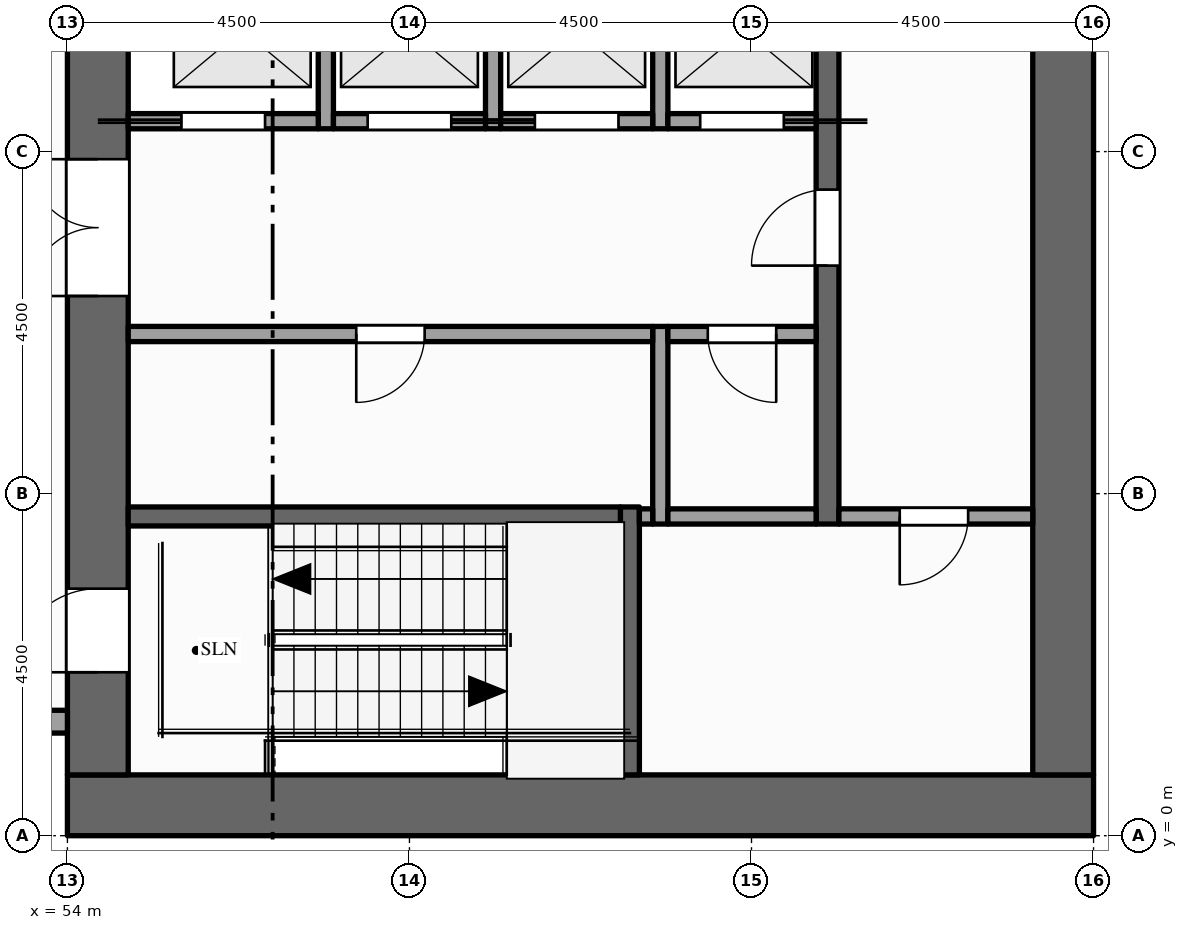
"""IFC4 building model, lengths in metres.
Left out: names, types, materials, properties, quantities, classifications, styles, units other than length and angle.
Written with IfcOpenShell. Run it as: python <this file> out.ifc"""

import sys

from ifc_helpers import new_model, si_unit, direction, frame, frame_2d, origin, place, context, subcontext, project, spatial, rectangle, extrude, element, fill, save


model = new_model("IFC4")
c1 = context("Model", 3, precision=1e-05, world=origin(), true_north=direction((0.0, 1.0)))
c2 = subcontext(c1, "Body", "Model", "MODEL_VIEW")
j1 = project(units=[si_unit("LENGTHUNIT", "METRE"), si_unit("PLANEANGLEUNIT", "RADIAN")], contexts=[c1])
p1 = place(None, origin())
s1 = spatial("IfcSite", under=j1, at=p1, CompositionType="ELEMENT")
p2 = place(p1, origin())
s2 = spatial("IfcBuilding", under=s1, at=p2, CompositionType="ELEMENT")
p3 = place(p2, frame((0.0, 0.0, 289.0)))
s3 = spatial("IfcBuildingStorey", under=s2, at=p3, CompositionType="ELEMENT", Elevation=289.0)
p4 = place(p3, frame((67.5, 0.4, -0.15), z_axis=(0.0, 0.0, 1.0), x_axis=(-1.0, 0.0, 0.0)))
e1 = element("IfcWall", 1, at=p4, inside=s3, PredefinedType="SHEAR", context=c2, shape_type="SweptSolid", body=[
    extrude(rectangle(XDim=13.5, YDim=0.8, at=frame_2d((6.75, 0.0))), origin(), (0.0, 0.0, 1.0), 4.0),
])
p5 = place(p3, frame((54.4, 0.8, -0.15), z_axis=(0.0, 0.0, 1.0), x_axis=(0.0, 1.0, 0.0)))
e2 = element("IfcWall", 2, at=p5, inside=s3, PredefinedType="SHEAR", context=c2, shape_type="SweptSolid", body=[
    extrude(rectangle(XDim=20.9, YDim=0.8, at=frame_2d((10.45, 0.0))), origin(), (0.0, 0.0, 1.0), 4.0),
])
p6 = place(p5, frame((6.3, 0.0, 0.15)))
e3 = element("IfcOpeningElement", 3, at=p6, cuts=e2, PredefinedType="OPENING", context=c2, shape_type="SweptSolid", body=[
    extrude(rectangle(XDim=1.8, YDim=2.1, at=frame_2d((0.9, 1.05))), frame((0.0, 0.41, 0.0), z_axis=(0.0, -1.0, 0.0), x_axis=(1.0, 0.0, 0.0)), (0.0, 0.0, 1.0), 0.82),
])
p7 = place(p5, frame((12.35, 0.0, 0.15)))
e4 = element("IfcOpeningElement", 4, at=p7, cuts=e2, PredefinedType="OPENING", context=c2, shape_type="SweptSolid", body=[
    extrude(rectangle(XDim=1.1, YDim=2.1, at=frame_2d((0.55, 1.05))), frame((0.0, 0.41, 0.0), z_axis=(0.0, -1.0, 0.0), x_axis=(1.0, 0.0, 0.0)), (0.0, 0.0, 1.0), 0.82),
])
p8 = place(p5, frame((1.35, 0.0, 0.15)))
e5 = element("IfcOpeningElement", 5, at=p8, cuts=e2, PredefinedType="OPENING", context=c2, shape_type="SweptSolid", body=[
    extrude(rectangle(XDim=1.1, YDim=2.1, at=frame_2d((0.55, 1.05))), frame((0.0, 0.41, 0.0), z_axis=(0.0, -1.0, 0.0), x_axis=(1.0, 0.0, 0.0)), (0.0, 0.0, 1.0), 0.82),
])
p9 = place(p5, frame((18.55, 0.0, 0.15)))
e6 = element("IfcOpeningElement", 6, at=p9, cuts=e2, PredefinedType="OPENING", context=c2, shape_type="SweptSolid", body=[
    extrude(rectangle(XDim=1.1, YDim=2.1, at=frame_2d((0.55, 1.05))), frame((0.0, 0.41, 0.0), z_axis=(0.0, -1.0, 0.0), x_axis=(1.0, 0.0, 0.0)), (0.0, 0.0, 1.0), 0.82),
])
p10 = place(p3, frame((67.1, 0.8, -0.15), z_axis=(0.0, 0.0, 1.0), x_axis=(0.0, 1.0, 0.0)))
e7 = element("IfcWall", 7, at=p10, inside=s3, PredefinedType="SHEAR", context=c2, shape_type="SweptSolid", body=[
    extrude(rectangle(XDim=20.9, YDim=0.8, at=frame_2d((10.45, 0.0))), origin(), (0.0, 0.0, 1.0), 4.0),
])
p11 = place(p3, frame((49.825, 1.5, 0.0), z_axis=(0.0, 0.0, 1.0), x_axis=(1.0, 0.0, 0.0)))
e8 = element("IfcWall", 8, at=p11, inside=s3, PredefinedType="STANDARD", context=c2, shape_type="SweptSolid", body=[
    extrude(rectangle(XDim=4.175, YDim=0.3, at=frame_2d((2.087, 0.0))), origin(), (0.0, 0.0, 1.0), 2.87),
])
p12 = place(p11, frame((0.413, 0.0, 0.9)))
e9 = element("IfcOpeningElement", 9, at=p12, cuts=e8, PredefinedType="OPENING", context=c2, shape_type="SweptSolid", body=[
    extrude(rectangle(XDim=1.2, YDim=1.75, at=frame_2d((0.6, 0.875))), frame((0.0, 0.16, 0.0), z_axis=(0.0, -1.0, 0.0), x_axis=(1.0, 0.0, 0.0)), (0.0, 0.0, 1.0), 0.32),
])
p13 = place(p11, frame((2.225, 0.0, 0.9)))
e10 = element("IfcOpeningElement", 10, at=p13, cuts=e8, PredefinedType="OPENING", context=c2, shape_type="SweptSolid", body=[
    extrude(rectangle(XDim=1.55, YDim=1.75, at=frame_2d((0.775, 0.875))), frame((0.0, 0.16, 0.0), z_axis=(0.0, -1.0, 0.0), x_axis=(1.0, 0.0, 0.0)), (0.0, 0.0, 1.0), 0.32),
])
for number, where, z_axis, x_axis in (
    (11, (57.4, 9.3, 0.0), (0.0, 0.0, 1.0), (0.0, 1.0, 0.0)),
    (12, (59.6, 9.3, 0.0), (0.0, 0.0, 1.0), (0.0, 1.0, 0.0)),
):
    element("IfcWall", number, at=place(p3, frame(where, z_axis=z_axis, x_axis=x_axis)), inside=s3, PredefinedType="SOLIDWALL", context=c2, shape_type="SweptSolid", body=[
        extrude(rectangle(XDim=2.6, YDim=0.2, at=frame_2d((1.3, 0.0))), origin(), (0.0, 0.0, 1.0), 3.85),
    ])
p14 = place(p3, frame((61.4, 0.8, 0.0), z_axis=(0.0, 0.0, 1.0), x_axis=(0.0, 1.0, 0.0)))
e13 = element("IfcWall", 13, at=p14, inside=s3, PredefinedType="SHEAR", context=c2, shape_type="SweptSolid", body=[
    extrude(rectangle(XDim=3.525, YDim=0.25, at=frame_2d((1.762, 0.0))), origin(), (0.0, 0.0, 1.0), 3.85),
])
p15 = place(p3, frame((61.8, 4.1, 0.0), z_axis=(0.0, 0.0, 1.0), x_axis=(0.0, 1.0, 0.0)))
e14 = element("IfcWall", 14, at=p15, inside=s3, PredefinedType="PARTITIONING", context=c2, shape_type="SweptSolid", body=[
    extrude(rectangle(XDim=2.6, YDim=0.2, at=frame_2d((1.3, 0.0))), origin(), (0.0, 0.0, 1.0), 3.85),
])
p16 = place(p3, frame((61.8, 9.3, 0.0), z_axis=(0.0, 0.0, 1.0), x_axis=(0.0, 1.0, 0.0)))
e15 = element("IfcWall", 15, at=p16, inside=s3, PredefinedType="SOLIDWALL", context=c2, shape_type="SweptSolid", body=[
    extrude(rectangle(XDim=2.6, YDim=0.2, at=frame_2d((1.3, 0.0))), origin(), (0.0, 0.0, 1.0), 3.85),
])
p17 = place(p3, frame((64.0, 4.1, 0.0), z_axis=(0.0, 0.0, 1.0), x_axis=(0.0, 1.0, 0.0)))
e16 = element("IfcWall", 16, at=p17, inside=s3, PredefinedType="SHEAR", context=c2, shape_type="SweptSolid", body=[
    extrude(rectangle(XDim=14.5, YDim=0.3, at=frame_2d((7.25, 0.0))), origin(), (0.0, 0.0, 1.0), 3.85),
])
p18 = place(p17, frame((3.4, 0.0, 0.0)))
e17 = element("IfcOpeningElement", 17, at=p18, cuts=e16, PredefinedType="OPENING", context=c2, shape_type="SweptSolid", body=[
    extrude(rectangle(XDim=1.0, YDim=2.1, at=frame_2d((0.5, 1.05))), frame((0.0, 0.16, 0.0), z_axis=(0.0, -1.0, 0.0), x_axis=(1.0, 0.0, 0.0)), (0.0, 0.0, 1.0), 0.32),
])
p19 = place(p17, frame((9.1, 0.0, 0.0)))
e18 = element("IfcOpeningElement", 18, at=p19, cuts=e16, PredefinedType="OPENING", context=c2, shape_type="SweptSolid", body=[
    extrude(rectangle(XDim=1.0, YDim=2.1, at=frame_2d((0.5, 1.05))), frame((0.0, 0.16, 0.0), z_axis=(0.0, -1.0, 0.0), x_axis=(1.0, 0.0, 0.0)), (0.0, 0.0, 1.0), 0.32),
])
p20 = place(p3, frame((54.8, 4.2, 0.0), z_axis=(0.0, 0.0, 1.0), x_axis=(1.0, 0.0, 0.0)))
e19 = element("IfcWall", 19, at=p20, inside=s3, PredefinedType="SHEAR", context=c2, shape_type="SweptSolid", body=[
    extrude(rectangle(XDim=6.475, YDim=0.25, at=frame_2d((3.237, 0.0))), origin(), (0.0, 0.0, 1.0), 3.85),
])
p21 = place(p3, frame((61.525, 4.2, 0.0), z_axis=(0.0, 0.0, 1.0), x_axis=(1.0, 0.0, 0.0)))
e20 = element("IfcWall", 20, at=p21, inside=s3, PredefinedType="PARTITIONING", context=c2, shape_type="SweptSolid", body=[
    extrude(rectangle(XDim=0.175, YDim=0.2, at=frame_2d((0.087, 0.0))), origin(), (0.0, 0.0, 1.0), 3.85),
])
p22 = place(p3, frame((61.9, 4.2, 0.0), z_axis=(0.0, 0.0, 1.0), x_axis=(1.0, 0.0, 0.0)))
e21 = element("IfcWall", 21, at=p22, inside=s3, PredefinedType="PARTITIONING", context=c2, shape_type="SweptSolid", body=[
    extrude(rectangle(XDim=1.95, YDim=0.2, at=frame_2d((0.975, 0.0))), origin(), (0.0, 0.0, 1.0), 3.85),
])
p23 = place(p3, frame((64.15, 4.2, 0.0), z_axis=(0.0, 0.0, 1.0), x_axis=(1.0, 0.0, 0.0)))
e22 = element("IfcWall", 22, at=p23, inside=s3, PredefinedType="PARTITIONING", context=c2, shape_type="SweptSolid", body=[
    extrude(rectangle(XDim=2.55, YDim=0.2, at=frame_2d((1.275, 0.0))), origin(), (0.0, 0.0, 1.0), 3.85),
])
p24 = place(p23, frame((0.8, 0.0, 0.0)))
e23 = element("IfcOpeningElement", 23, at=p24, cuts=e22, PredefinedType="OPENING", context=c2, shape_type="SweptSolid", body=[
    extrude(rectangle(XDim=0.9, YDim=2.1, at=frame_2d((0.45, 1.05))), frame((0.0, 0.11, 0.0), z_axis=(0.0, -1.0, 0.0), x_axis=(1.0, 0.0, 0.0)), (0.0, 0.0, 1.0), 0.22),
])
p25 = place(p3, frame((54.8, 6.6, 0.0), z_axis=(0.0, 0.0, 1.0), x_axis=(1.0, 0.0, 0.0)))
e24 = element("IfcWall", 24, at=p25, inside=s3, PredefinedType="PARTITIONING", context=c2, shape_type="SweptSolid", body=[
    extrude(rectangle(XDim=6.9, YDim=0.2, at=frame_2d((3.45, 0.0))), origin(), (0.0, 0.0, 1.0), 3.85),
])
p26 = place(p25, frame((3.0, 0.0, 0.0)))
e25 = element("IfcOpeningElement", 25, at=p26, cuts=e24, PredefinedType="OPENING", context=c2, shape_type="SweptSolid", body=[
    extrude(rectangle(XDim=0.9, YDim=2.1, at=frame_2d((0.45, 1.05))), frame((0.0, 0.11, 0.0), z_axis=(0.0, -1.0, 0.0), x_axis=(1.0, 0.0, 0.0)), (0.0, 0.0, 1.0), 0.22),
])
p27 = place(p3, frame((61.9, 6.6, 0.0), z_axis=(0.0, 0.0, 1.0), x_axis=(1.0, 0.0, 0.0)))
e26 = element("IfcWall", 26, at=p27, inside=s3, PredefinedType="PARTITIONING", context=c2, shape_type="SweptSolid", body=[
    extrude(rectangle(XDim=1.95, YDim=0.2, at=frame_2d((0.975, 0.0))), origin(), (0.0, 0.0, 1.0), 3.85),
])
p28 = place(p27, frame((0.525, 0.0, 0.0)))
e27 = element("IfcOpeningElement", 27, at=p28, cuts=e26, PredefinedType="OPENING", context=c2, shape_type="SweptSolid", body=[
    extrude(rectangle(XDim=0.9, YDim=2.1, at=frame_2d((0.45, 1.05))), frame((0.0, 0.11, 0.0), z_axis=(0.0, -1.0, 0.0), x_axis=(1.0, 0.0, 0.0)), (0.0, 0.0, 1.0), 0.22),
])
p29 = place(p3, frame((54.8, 9.4, 0.0), z_axis=(0.0, 0.0, 1.0), x_axis=(1.0, 0.0, 0.0)))
e28 = element("IfcWall", 28, at=p29, inside=s3, PredefinedType="SOLIDWALL", context=c2, shape_type="SweptSolid", body=[
    extrude(rectangle(XDim=2.5, YDim=0.2, at=frame_2d((1.25, 0.0))), origin(), (0.0, 0.0, 1.0), 3.85),
])
p30 = place(p29, frame((0.7, 0.0, 0.012)))
e29 = element("IfcOpeningElement", 29, at=p30, cuts=e28, PredefinedType="OPENING", context=c2, shape_type="SweptSolid", body=[
    extrude(rectangle(XDim=1.1, YDim=2.1, at=frame_2d((0.55, 1.05))), frame((0.0, 0.11, 0.0), z_axis=(0.0, -1.0, 0.0), x_axis=(1.0, 0.0, 0.0)), (0.0, 0.0, 1.0), 0.22),
])
p31 = place(p3, frame((57.5, 9.4, 0.0), z_axis=(0.0, 0.0, 1.0), x_axis=(1.0, 0.0, 0.0)))
e30 = element("IfcWall", 30, at=p31, inside=s3, PredefinedType="SOLIDWALL", context=c2, shape_type="SweptSolid", body=[
    extrude(rectangle(XDim=2.0, YDim=0.2, at=frame_2d((1.0, 0.0))), origin(), (0.0, 0.0, 1.0), 3.85),
])
p32 = place(p31, frame((0.45, 0.0, 0.012)))
e31 = element("IfcOpeningElement", 31, at=p32, cuts=e30, PredefinedType="OPENING", context=c2, shape_type="SweptSolid", body=[
    extrude(rectangle(XDim=1.1, YDim=2.1, at=frame_2d((0.55, 1.05))), frame((0.0, 0.11, 0.0), z_axis=(0.0, -1.0, 0.0), x_axis=(1.0, 0.0, 0.0)), (0.0, 0.0, 1.0), 0.22),
])
p33 = place(p3, frame((59.7, 9.4, 0.0), z_axis=(0.0, 0.0, 1.0), x_axis=(1.0, 0.0, 0.0)))
e32 = element("IfcWall", 32, at=p33, inside=s3, PredefinedType="SOLIDWALL", context=c2, shape_type="SweptSolid", body=[
    extrude(rectangle(XDim=2.0, YDim=0.2, at=frame_2d((1.0, 0.0))), origin(), (0.0, 0.0, 1.0), 3.85),
])
p34 = place(p33, frame((0.45, 0.0, 0.012)))
e33 = element("IfcOpeningElement", 33, at=p34, cuts=e32, PredefinedType="OPENING", context=c2, shape_type="SweptSolid", body=[
    extrude(rectangle(XDim=1.1, YDim=2.1, at=frame_2d((0.55, 1.05))), frame((0.0, 0.11, 0.0), z_axis=(0.0, -1.0, 0.0), x_axis=(1.0, 0.0, 0.0)), (0.0, 0.0, 1.0), 0.22),
])
p35 = place(p3, frame((61.9, 9.4, 0.0), z_axis=(0.0, 0.0, 1.0), x_axis=(1.0, 0.0, 0.0)))
e34 = element("IfcWall", 34, at=p35, inside=s3, PredefinedType="SOLIDWALL", context=c2, shape_type="SweptSolid", body=[
    extrude(rectangle(XDim=1.95, YDim=0.2, at=frame_2d((0.975, 0.0))), origin(), (0.0, 0.0, 1.0), 3.85),
])
p36 = place(p35, frame((0.425, 0.0, 0.012)))
e35 = element("IfcOpeningElement", 35, at=p36, cuts=e34, PredefinedType="OPENING", context=c2, shape_type="SweptSolid", body=[
    extrude(rectangle(XDim=1.1, YDim=2.1, at=frame_2d((0.55, 1.05))), frame((0.0, 0.11, 0.0), z_axis=(0.0, -1.0, 0.0), x_axis=(1.0, 0.0, 0.0)), (0.0, 0.0, 1.0), 0.22),
])
p37 = place(p30, origin())
e36 = element("IfcDoor", 36, at=p37, inside=s3, OperationType="SLIDING_TO_LEFT", PredefinedType="DOOR", context=c2, shape_type="SweptSolid", body=[
    extrude(rectangle(XDim=1.1, YDim=2.1, at=frame_2d((0.55, 1.05))), frame((0.0, 0.025, 0.0), z_axis=(0.0, -1.0, 0.0), x_axis=(1.0, 0.0, 0.0)), (0.0, 0.0, 1.0), 0.05),
])
fill(e29, e36)
p38 = place(p32, origin())
e37 = element("IfcDoor", 37, at=p38, inside=s3, OperationType="SLIDING_TO_RIGHT", PredefinedType="DOOR", context=c2, shape_type="SweptSolid", body=[
    extrude(rectangle(XDim=1.1, YDim=2.1, at=frame_2d((0.55, 1.05))), frame((0.0, 0.025, 0.0), z_axis=(0.0, -1.0, 0.0), x_axis=(1.0, 0.0, 0.0)), (0.0, 0.0, 1.0), 0.05),
])
fill(e31, e37)
p39 = place(p34, origin())
e38 = element("IfcDoor", 38, at=p39, inside=s3, OperationType="SLIDING_TO_LEFT", PredefinedType="DOOR", context=c2, shape_type="SweptSolid", body=[
    extrude(rectangle(XDim=1.1, YDim=2.1, at=frame_2d((0.55, 1.05))), frame((0.0, 0.025, 0.0), z_axis=(0.0, -1.0, 0.0), x_axis=(1.0, 0.0, 0.0)), (0.0, 0.0, 1.0), 0.05),
])
fill(e33, e38)
p40 = place(p36, origin())
e39 = element("IfcDoor", 39, at=p40, inside=s3, OperationType="SLIDING_TO_RIGHT", PredefinedType="DOOR", context=c2, shape_type="SweptSolid", body=[
    extrude(rectangle(XDim=1.1, YDim=2.1, at=frame_2d((0.55, 1.05))), frame((0.0, 0.025, 0.0), z_axis=(0.0, -1.0, 0.0), x_axis=(1.0, 0.0, 0.0)), (0.0, 0.0, 1.0), 0.05),
])
fill(e35, e39)
p41 = place(p6, origin())
e40 = element("IfcDoor", 40, at=p41, inside=s3, OperationType="DOUBLE_DOOR_SINGLE_SWING", PredefinedType="DOOR", context=c2, shape_type="SweptSolid", body=[
    extrude(rectangle(XDim=1.8, YDim=2.1, at=frame_2d((0.9, 1.05))), frame((0.0, 0.025, 0.0), z_axis=(0.0, -1.0, 0.0), x_axis=(1.0, 0.0, 0.0)), (0.0, 0.0, 1.0), 0.05),
])
fill(e3, e40)
p42 = place(p18, origin())
e41 = element("IfcDoor", 41, at=p42, inside=s3, OperationType="SINGLE_SWING_LEFT", PredefinedType="DOOR", context=c2, shape_type="SweptSolid", body=[
    extrude(rectangle(XDim=1.0, YDim=2.1, at=frame_2d((0.5, 1.05))), frame((0.0, 0.025, 0.0), z_axis=(0.0, -1.0, 0.0), x_axis=(1.0, 0.0, 0.0)), (0.0, 0.0, 1.0), 0.05),
])
fill(e17, e41)
p43 = place(p8, origin())
e42 = element("IfcDoor", 42, at=p43, inside=s3, OperationType="SINGLE_SWING_LEFT", PredefinedType="DOOR", context=c2, shape_type="SweptSolid", body=[
    extrude(rectangle(XDim=1.1, YDim=2.1, at=frame_2d((0.55, 1.05))), frame((0.0, 0.025, 0.0), z_axis=(0.0, -1.0, 0.0), x_axis=(1.0, 0.0, 0.0)), (0.0, 0.0, 1.0), 0.05),
])
fill(e5, e42)
p44 = place(p24, origin())
e43 = element("IfcDoor", 43, at=p44, inside=s3, OperationType="SINGLE_SWING_LEFT", PredefinedType="DOOR", context=c2, shape_type="SweptSolid", body=[
    extrude(rectangle(XDim=0.9, YDim=2.1, at=frame_2d((0.45, 1.05))), frame((0.0, 0.025, 0.0), z_axis=(0.0, -1.0, 0.0), x_axis=(1.0, 0.0, 0.0)), (0.0, 0.0, 1.0), 0.05),
])
fill(e23, e43)
p45 = place(p26, origin())
e44 = element("IfcDoor", 44, at=p45, inside=s3, OperationType="SINGLE_SWING_LEFT", PredefinedType="DOOR", context=c2, shape_type="SweptSolid", body=[
    extrude(rectangle(XDim=0.9, YDim=2.1, at=frame_2d((0.45, 1.05))), frame((0.0, 0.025, 0.0), z_axis=(0.0, -1.0, 0.0), x_axis=(1.0, 0.0, 0.0)), (0.0, 0.0, 1.0), 0.05),
])
fill(e25, e44)
p46 = place(p28, origin())
e45 = element("IfcDoor", 45, at=p46, inside=s3, OperationType="SINGLE_SWING_RIGHT", PredefinedType="DOOR", context=c2, shape_type="SweptSolid", body=[
    extrude(rectangle(XDim=0.9, YDim=2.1, at=frame_2d((0.45, 1.05))), frame((0.0, 0.025, 0.0), z_axis=(0.0, -1.0, 0.0), x_axis=(1.0, 0.0, 0.0)), (0.0, 0.0, 1.0), 0.05),
])
fill(e27, e45)
save(model, sys.argv[1])
